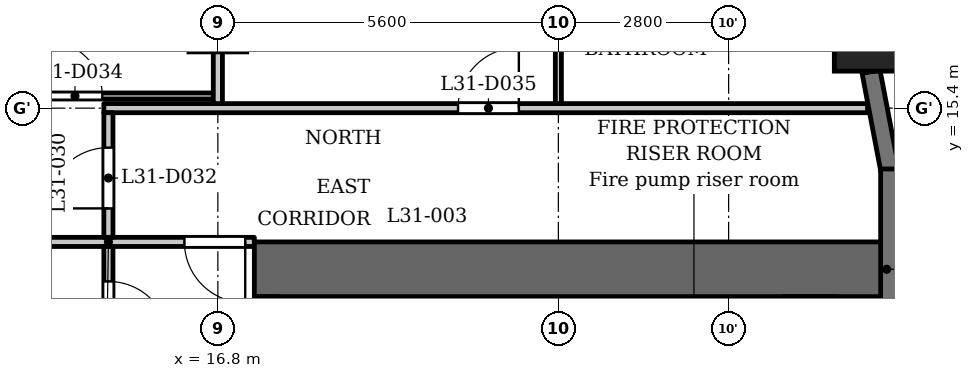
"""IFC4 building model, lengths in metres.
Left out: names, types, materials, properties, quantities, classifications, styles, units other than length and angle.
Written with IfcOpenShell. Run it as: python <this file> out.ifc"""

import sys

from ifc_helpers import new_model, si_unit, direction, frame, frame_2d, origin, origin_2d, place, context, subcontext, project, spatial, rectangle, extrude, element, fill, save


model = new_model("IFC4")
c1 = context("Model", 3, precision=1e-05, world=origin(), true_north=direction((0.0, 1.0)))
c2 = subcontext(c1, "Body", "Model", "MODEL_VIEW")
j1 = project(units=[si_unit("LENGTHUNIT", "METRE"), si_unit("PLANEANGLEUNIT", "RADIAN")], contexts=[c1])
p1 = place(None, origin())
s1 = spatial("IfcSite", under=j1, at=p1, CompositionType="ELEMENT")
p2 = place(p1, origin())
s2 = spatial("IfcBuilding", under=s1, at=p2, CompositionType="ELEMENT")
p3 = place(p2, frame((0.0, 0.0, 121.8)))
s3 = spatial("IfcBuildingStorey", under=s2, at=p3, CompositionType="ELEMENT", Elevation=121.8)
p4 = place(p3, frame((27.538, 16.609, 0.0), z_axis=(0.0, 0.0, 1.0), x_axis=(1.0, 0.0, 0.0)))
e1 = element("IfcColumn", 1, at=p4, inside=s3, PredefinedType="COLUMN", context=c2, shape_type="SweptSolid", body=[
    extrude(rectangle(XDim=1.2, YDim=1.2, at=origin_2d()), origin(), (0.0, 0.0, 1.0), 3.5),
])
p5 = place(p3, frame((16.8, 16.8, 0.0), z_axis=(0.0, 0.0, 1.0), x_axis=(1.0, 0.0, 0.0)))
e2 = element("IfcColumn", 2, at=p5, inside=s3, PredefinedType="COLUMN", context=c2, shape_type="SweptSolid", body=[
    extrude(rectangle(XDim=0.95, YDim=0.95, at=origin_2d()), origin(), (0.0, 0.0, 1.0), 3.5),
])
p6 = place(p3, frame((27.85, 11.8, 0.0), z_axis=(0.0, 0.0, 1.0), x_axis=(0.0, 1.0, 0.0)))
e3 = element("IfcWall", 3, at=p6, inside=s3, PredefinedType="SOLIDWALL", context=c2, shape_type="SweptSolid", body=[
    extrude(rectangle(XDim=2.6, YDim=0.3, at=frame_2d((1.3, 0.0))), origin(), (0.0, 0.0, 1.0), 2.35),
])
p7 = place(p3, frame((27.853, 14.372, 0.0), z_axis=(0.0, 0.0, 1.0), x_axis=(-0.187349172861, 0.982293381546, 0.0)))
e4 = element("IfcWall", 4, at=p7, inside=s3, PredefinedType="SOLIDWALL", context=c2, shape_type="SweptSolid", body=[
    extrude(rectangle(XDim=1.656, YDim=0.3, at=frame_2d((0.828, 0.0))), origin(), (0.0, 0.0, 1.0), 2.35),
])
p8 = place(p3, frame((17.4, 12.75, 0.0), z_axis=(0.0, 0.0, 1.0), x_axis=(1.0, 0.0, 0.0)))
e5 = element("IfcWall", 5, at=p8, inside=s3, PredefinedType="SHEAR", context=c2, shape_type="SweptSolid", body=[
    extrude(rectangle(XDim=10.4, YDim=0.9, at=frame_2d((5.2, 0.0))), origin(), (0.0, 0.0, 1.0), 3.15),
])
p9 = place(p3, frame((17.6, -12.3, 0.0), z_axis=(0.0, 0.0, 1.0), x_axis=(0.0, 1.0, 0.0)))
e6 = element("IfcWall", 6, at=p9, inside=s3, PredefinedType="SHEAR", context=c2, shape_type="SweptSolid", body=[
    extrude(rectangle(XDim=24.6, YDim=0.4, at=frame_2d((12.3, 0.0))), origin(), (0.0, 0.0, 1.0), 3.15),
])
p10 = place(p9, frame((6.0, 0.0, 0.0)))
e7 = element("IfcOpeningElement", 7, at=p10, cuts=e6, PredefinedType="OPENING", context=c2, shape_type="SweptSolid", body=[
    extrude(rectangle(XDim=1.1, YDim=2.1, at=frame_2d((0.55, 1.05))), frame((0.0, 0.21, 0.0), z_axis=(0.0, -1.0, 0.0), x_axis=(1.0, 0.0, 0.0)), (0.0, 0.0, 1.0), 0.42),
])
p11 = place(p9, frame((8.4, 0.0, 0.0)))
e8 = element("IfcOpeningElement", 8, at=p11, cuts=e6, PredefinedType="OPENING", context=c2, shape_type="SweptSolid", body=[
    extrude(rectangle(XDim=1.1, YDim=2.1, at=frame_2d((0.55, 1.05))), frame((0.0, 0.21, 0.0), z_axis=(0.0, -1.0, 0.0), x_axis=(1.0, 0.0, 0.0)), (0.0, 0.0, 1.0), 0.42),
])
p12 = place(p9, frame((10.8, 0.0, 0.0)))
e9 = element("IfcOpeningElement", 9, at=p12, cuts=e6, PredefinedType="OPENING", context=c2, shape_type="SweptSolid", body=[
    extrude(rectangle(XDim=1.1, YDim=2.1, at=frame_2d((0.55, 1.05))), frame((0.0, 0.21, 0.0), z_axis=(0.0, -1.0, 0.0), x_axis=(1.0, 0.0, 0.0)), (0.0, 0.0, 1.0), 0.42),
])
p13 = place(p9, frame((22.8, 0.0, 0.0)))
e10 = element("IfcOpeningElement", 10, at=p13, cuts=e6, PredefinedType="OPENING", context=c2, shape_type="SweptSolid", body=[
    extrude(rectangle(XDim=1.1, YDim=2.1, at=frame_2d((0.55, 1.05))), frame((0.0, 0.21, 0.0), z_axis=(0.0, -1.0, 0.0), x_axis=(1.0, 0.0, 0.0)), (0.0, 0.0, 1.0), 0.42),
])
p14 = place(p9, frame((0.7, 0.0, 0.0)))
e11 = element("IfcOpeningElement", 11, at=p14, cuts=e6, PredefinedType="OPENING", context=c2, shape_type="SweptSolid", body=[
    extrude(rectangle(XDim=1.1, YDim=2.1, at=frame_2d((0.55, 1.05))), frame((0.0, 0.21, 0.0), z_axis=(0.0, -1.0, 0.0), x_axis=(1.0, 0.0, 0.0)), (0.0, 0.0, 1.0), 0.42),
])
p15 = place(p9, frame((12.775, 0.0, 0.0)))
e12 = element("IfcOpeningElement", 12, at=p15, cuts=e6, PredefinedType="OPENING", context=c2, shape_type="SweptSolid", body=[
    extrude(rectangle(XDim=1.8, YDim=2.1, at=frame_2d((0.9, 1.05))), frame((0.0, 0.21, 0.0), z_axis=(0.0, -1.0, 0.0), x_axis=(1.0, 0.0, 0.0)), (0.0, 0.0, 1.0), 0.42),
])
p16 = place(p3, frame((26.55, -12.3, 0.0), z_axis=(0.0, 0.0, 1.0), x_axis=(0.0, 1.0, 0.0)))
e13 = element("IfcWall", 13, at=p16, inside=s3, PredefinedType="SHEAR", context=c2, shape_type="SweptSolid", body=[
    extrude(rectangle(XDim=24.6, YDim=0.9, at=frame_2d((12.3, 0.0))), origin(), (0.0, 0.0, 1.0), 3.15),
])
p17 = place(p3, frame((23.55, 9.8, 0.0), z_axis=(0.0, 0.0, 1.0), x_axis=(0.0, 1.0, 0.0)))
e14 = element("IfcWall", 14, at=p17, inside=s3, PredefinedType="PARTITIONING", context=c2, shape_type="SweptSolid", body=[
    extrude(rectangle(XDim=2.5, YDim=0.2, at=frame_2d((1.25, 0.0))), origin(), (0.0, 0.0, 1.0), 3.15),
])
p18 = place(p17, frame((0.8, 0.0, 0.0)))
e15 = element("IfcOpeningElement", 15, at=p18, cuts=e14, PredefinedType="OPENING", context=c2, shape_type="SweptSolid", body=[
    extrude(rectangle(XDim=0.9, YDim=2.1, at=frame_2d((0.45, 1.05))), frame((0.0, 0.11, 0.0), z_axis=(0.0, -1.0, 0.0), x_axis=(1.0, 0.0, 0.0)), (0.0, 0.0, 1.0), 0.22),
])
p19 = place(p3, frame((-17.4, 13.2, 0.0), z_axis=(0.0, 0.0, 1.0), x_axis=(1.0, 0.0, 0.0)))
e16 = element("IfcWall", 16, at=p19, inside=s3, PredefinedType="PARTITIONING", context=c2, shape_type="SweptSolid", body=[
    extrude(rectangle(XDim=34.8, YDim=0.15, at=frame_2d((17.4, 0.0))), origin(), (0.0, 0.0, 1.0), 3.15),
])
p20 = place(p19, frame((0.25, 0.0, 0.0)))
e17 = element("IfcOpeningElement", 17, at=p20, cuts=e16, PredefinedType="OPENING", context=c2, shape_type="SweptSolid", body=[
    extrude(rectangle(XDim=1.0, YDim=2.1, at=frame_2d((0.5, 1.05))), frame((0.0, 0.085, 0.0), z_axis=(0.0, -1.0, 0.0), x_axis=(1.0, 0.0, 0.0)), (0.0, 0.0, 1.0), 0.17),
])
p21 = place(p19, frame((33.65, 0.0, 0.0)))
e18 = element("IfcOpeningElement", 18, at=p21, cuts=e16, PredefinedType="OPENING", context=c2, shape_type="SweptSolid", body=[
    extrude(rectangle(XDim=1.0, YDim=2.1, at=frame_2d((0.5, 1.05))), frame((0.0, 0.085, 0.0), z_axis=(0.0, -1.0, 0.0), x_axis=(1.0, 0.0, 0.0)), (0.0, 0.0, 1.0), 0.17),
])
p22 = place(p19, frame((15.75, 0.0, 0.0)))
e19 = element("IfcOpeningElement", 19, at=p22, cuts=e16, PredefinedType="OPENING", context=c2, shape_type="SweptSolid", body=[
    extrude(rectangle(XDim=1.0, YDim=2.1, at=frame_2d((0.5, 1.05))), frame((0.0, 0.085, 0.0), z_axis=(0.0, -1.0, 0.0), x_axis=(1.0, 0.0, 0.0)), (0.0, 0.0, 1.0), 0.17),
])
p23 = place(p19, frame((18.1, 0.0, 0.0)))
e20 = element("IfcOpeningElement", 20, at=p23, cuts=e16, PredefinedType="OPENING", context=c2, shape_type="SweptSolid", body=[
    extrude(rectangle(XDim=1.0, YDim=2.1, at=frame_2d((0.5, 1.05))), frame((0.0, 0.085, 0.0), z_axis=(0.0, -1.0, 0.0), x_axis=(1.0, 0.0, 0.0)), (0.0, 0.0, 1.0), 0.17),
])
p24 = place(p19, frame((23.55, 0.0, 0.0)))
e21 = element("IfcOpeningElement", 21, at=p24, cuts=e16, PredefinedType="OPENING", context=c2, shape_type="SweptSolid", body=[
    extrude(rectangle(XDim=1.0, YDim=2.1, at=frame_2d((0.5, 1.05))), frame((0.0, 0.085, 0.0), z_axis=(0.0, -1.0, 0.0), x_axis=(1.0, 0.0, 0.0)), (0.0, 0.0, 1.0), 0.17),
])
p25 = place(p3, frame((14.925, 15.4, 0.0), z_axis=(0.0, 0.0, 1.0), x_axis=(1.0, 0.0, 0.0)))
e22 = element("IfcWall", 22, at=p25, inside=s3, PredefinedType="PARTITIONING", context=c2, shape_type="SweptSolid", body=[
    extrude(rectangle(XDim=12.559, YDim=0.15, at=frame_2d((6.279, 0.0))), origin(), (0.0, 0.0, 1.0), 3.15),
])
p26 = place(p25, frame((5.825, 0.0, 0.0)))
e23 = element("IfcOpeningElement", 23, at=p26, cuts=e22, PredefinedType="OPENING", context=c2, shape_type="SweptSolid", body=[
    extrude(rectangle(XDim=1.0, YDim=2.1, at=frame_2d((0.5, 1.05))), frame((0.0, 0.085, 0.0), z_axis=(0.0, -1.0, 0.0), x_axis=(1.0, 0.0, 0.0)), (0.0, 0.0, 1.0), 0.17),
])
p27 = place(p3, frame((-16.725, 15.6, 0.0), z_axis=(0.0, 0.0, 1.0), x_axis=(1.0, 0.0, 0.0)))
e24 = element("IfcWall", 24, at=p27, inside=s3, PredefinedType="PARTITIONING", context=c2, shape_type="SweptSolid", body=[
    extrude(rectangle(XDim=33.45, YDim=0.1, at=frame_2d((16.725, 0.0))), origin(), (0.0, 0.0, 1.0), 3.15),
])
p28 = place(p27, frame((9.425, 0.0, 0.0)))
e25 = element("IfcOpeningElement", 25, at=p28, cuts=e24, PredefinedType="OPENING", context=c2, shape_type="SweptSolid", body=[
    extrude(rectangle(XDim=0.8, YDim=2.1, at=frame_2d((0.4, 1.05))), frame((0.0, 0.06, 0.0), z_axis=(0.0, -1.0, 0.0), x_axis=(1.0, 0.0, 0.0)), (0.0, 0.0, 1.0), 0.12),
])
p29 = place(p27, frame((6.975, 0.0, 0.0)))
e26 = element("IfcOpeningElement", 26, at=p29, cuts=e24, PredefinedType="OPENING", context=c2, shape_type="SweptSolid", body=[
    extrude(rectangle(XDim=0.9, YDim=2.1, at=frame_2d((0.45, 1.05))), frame((0.0, 0.06, 0.0), z_axis=(0.0, -1.0, 0.0), x_axis=(1.0, 0.0, 0.0)), (0.0, 0.0, 1.0), 0.12),
])
p30 = place(p27, frame((1.875, 0.0, 0.0)))
e27 = element("IfcOpeningElement", 27, at=p30, cuts=e24, PredefinedType="OPENING", context=c2, shape_type="SweptSolid", body=[
    extrude(rectangle(XDim=0.9, YDim=2.1, at=frame_2d((0.45, 1.05))), frame((0.0, 0.06, 0.0), z_axis=(0.0, -1.0, 0.0), x_axis=(1.0, 0.0, 0.0)), (0.0, 0.0, 1.0), 0.12),
])
p31 = place(p27, frame((3.475, 0.0, 0.0)))
e28 = element("IfcOpeningElement", 28, at=p31, cuts=e24, PredefinedType="OPENING", context=c2, shape_type="SweptSolid", body=[
    extrude(rectangle(XDim=0.9, YDim=2.1, at=frame_2d((0.45, 1.05))), frame((0.0, 0.06, 0.0), z_axis=(0.0, -1.0, 0.0), x_axis=(1.0, 0.0, 0.0)), (0.0, 0.0, 1.0), 0.12),
])
p32 = place(p27, frame((11.775, 0.0, 0.0)))
e29 = element("IfcOpeningElement", 29, at=p32, cuts=e24, PredefinedType="OPENING", context=c2, shape_type="SweptSolid", body=[
    extrude(rectangle(XDim=0.8, YDim=2.1, at=frame_2d((0.4, 1.05))), frame((0.0, 0.06, 0.0), z_axis=(0.0, -1.0, 0.0), x_axis=(1.0, 0.0, 0.0)), (0.0, 0.0, 1.0), 0.12),
])
p33 = place(p27, frame((14.175, 0.0, 0.0)))
e30 = element("IfcOpeningElement", 30, at=p33, cuts=e24, PredefinedType="OPENING", context=c2, shape_type="SweptSolid", body=[
    extrude(rectangle(XDim=0.9, YDim=2.1, at=frame_2d((0.45, 1.05))), frame((0.0, 0.06, 0.0), z_axis=(0.0, -1.0, 0.0), x_axis=(1.0, 0.0, 0.0)), (0.0, 0.0, 1.0), 0.12),
])
p34 = place(p27, frame((20.725, 0.0, 0.0)))
e31 = element("IfcOpeningElement", 31, at=p34, cuts=e24, PredefinedType="OPENING", context=c2, shape_type="SweptSolid", body=[
    extrude(rectangle(XDim=0.8, YDim=2.1, at=frame_2d((0.4, 1.05))), frame((0.0, 0.06, 0.0), z_axis=(0.0, -1.0, 0.0), x_axis=(1.0, 0.0, 0.0)), (0.0, 0.0, 1.0), 0.12),
])
p35 = place(p27, frame((18.375, 0.0, 0.0)))
e32 = element("IfcOpeningElement", 32, at=p35, cuts=e24, PredefinedType="OPENING", context=c2, shape_type="SweptSolid", body=[
    extrude(rectangle(XDim=0.9, YDim=2.1, at=frame_2d((0.45, 1.05))), frame((0.0, 0.06, 0.0), z_axis=(0.0, -1.0, 0.0), x_axis=(1.0, 0.0, 0.0)), (0.0, 0.0, 1.0), 0.12),
])
p36 = place(p27, frame((26.425, 0.0, 0.0)))
e33 = element("IfcOpeningElement", 33, at=p36, cuts=e24, PredefinedType="OPENING", context=c2, shape_type="SweptSolid", body=[
    extrude(rectangle(XDim=0.8, YDim=2.1, at=frame_2d((0.4, 1.05))), frame((0.0, 0.06, 0.0), z_axis=(0.0, -1.0, 0.0), x_axis=(1.0, 0.0, 0.0)), (0.0, 0.0, 1.0), 0.12),
])
p37 = place(p27, frame((23.875, 0.0, 0.0)))
e34 = element("IfcOpeningElement", 34, at=p37, cuts=e24, PredefinedType="OPENING", context=c2, shape_type="SweptSolid", body=[
    extrude(rectangle(XDim=0.9, YDim=2.1, at=frame_2d((0.45, 1.05))), frame((0.0, 0.06, 0.0), z_axis=(0.0, -1.0, 0.0), x_axis=(1.0, 0.0, 0.0)), (0.0, 0.0, 1.0), 0.12),
])
p38 = place(p27, frame((28.575, 0.0, 0.0)))
e35 = element("IfcOpeningElement", 35, at=p38, cuts=e24, PredefinedType="OPENING", context=c2, shape_type="SweptSolid", body=[
    extrude(rectangle(XDim=0.8, YDim=2.1, at=frame_2d((0.4, 1.05))), frame((0.0, 0.06, 0.0), z_axis=(0.0, -1.0, 0.0), x_axis=(1.0, 0.0, 0.0)), (0.0, 0.0, 1.0), 0.12),
])
p39 = place(p27, frame((30.725, 0.0, 0.0)))
e36 = element("IfcOpeningElement", 36, at=p39, cuts=e24, PredefinedType="OPENING", context=c2, shape_type="SweptSolid", body=[
    extrude(rectangle(XDim=0.9, YDim=2.1, at=frame_2d((0.45, 1.05))), frame((0.0, 0.06, 0.0), z_axis=(0.0, -1.0, 0.0), x_axis=(1.0, 0.0, 0.0)), (0.0, 0.0, 1.0), 0.12),
])
p40 = place(p3, frame((15.0, 6.769, 0.0), z_axis=(0.0, 0.0, 1.0), x_axis=(0.0, 1.0, 0.0)))
e37 = element("IfcWall", 37, at=p40, inside=s3, PredefinedType="PARTITIONING", context=c2, shape_type="SweptSolid", body=[
    extrude(rectangle(XDim=6.356, YDim=0.15, at=frame_2d((3.178, 0.0))), origin(), (0.0, 0.0, 1.0), 3.15),
])
p41 = place(p40, frame((4.781, 0.0, 0.0)))
e38 = element("IfcOpeningElement", 38, at=p41, cuts=e37, PredefinedType="OPENING", context=c2, shape_type="SweptSolid", body=[
    extrude(rectangle(XDim=1.0, YDim=2.1, at=frame_2d((0.5, 1.05))), frame((0.0, 0.085, 0.0), z_axis=(0.0, -1.0, 0.0), x_axis=(1.0, 0.0, 0.0)), (0.0, 0.0, 1.0), 0.17),
])
p42 = place(p3, frame((15.0, 13.275, 0.0), z_axis=(0.0, 0.0, 1.0), x_axis=(0.0, 1.0, 0.0)))
e39 = element("IfcWall", 39, at=p42, inside=s3, PredefinedType="PARTITIONING", context=c2, shape_type="SweptSolid", body=[
    extrude(rectangle(XDim=2.05, YDim=0.15, at=frame_2d((1.025, 0.0))), origin(), (0.0, 0.0, 1.0), 3.15),
])
p43 = place(p42, frame((0.476, 0.0, 0.0)))
e40 = element("IfcOpeningElement", 40, at=p43, cuts=e39, PredefinedType="OPENING", context=c2, shape_type="SweptSolid", body=[
    extrude(rectangle(XDim=1.0, YDim=2.1, at=frame_2d((0.5, 1.05))), frame((0.0, 0.085, 0.0), z_axis=(0.0, -1.0, 0.0), x_axis=(1.0, 0.0, 0.0)), (0.0, 0.0, 1.0), 0.17),
])
p44 = place(p3, frame((16.8, 15.475, 0.0), z_axis=(0.0, 0.0, 1.0), x_axis=(0.0, 1.0, 0.0)))
e41 = element("IfcWall", 41, at=p44, inside=s3, PredefinedType="PARTITIONING", context=c2, shape_type="SweptSolid", body=[
    extrude(rectangle(XDim=7.505, YDim=0.15, at=frame_2d((3.752, 0.0))), origin(), (0.0, 0.0, 1.0), 3.15),
])
p45 = place(p3, frame((22.4, 15.475, 0.0), z_axis=(0.0, 0.0, 1.0), x_axis=(0.0, 1.0, 0.0)))
e42 = element("IfcWall", 42, at=p45, inside=s3, PredefinedType="PARTITIONING", context=c2, shape_type="SweptSolid", body=[
    extrude(rectangle(XDim=2.575, YDim=0.1, at=frame_2d((1.288, 0.0))), origin(), (0.0, 0.0, 1.0), 3.15),
])
p46 = place(p41, origin())
e43 = element("IfcDoor", 43, at=p46, inside=s3, OperationType="SINGLE_SWING_LEFT", PredefinedType="DOOR", context=c2, shape_type="SweptSolid", body=[
    extrude(rectangle(XDim=1.0, YDim=2.1, at=frame_2d((0.5, 1.05))), frame((0.0, 0.025, 0.0), z_axis=(0.0, -1.0, 0.0), x_axis=(1.0, 0.0, 0.0)), (0.0, 0.0, 1.0), 0.05),
])
fill(e38, e43)
p47 = place(p21, origin())
e44 = element("IfcDoor", 44, at=p47, inside=s3, OperationType="SINGLE_SWING_RIGHT", PredefinedType="DOOR", context=c2, shape_type="SweptSolid", body=[
    extrude(rectangle(XDim=1.0, YDim=2.1, at=frame_2d((0.5, 1.05))), frame((0.0, 0.025, 0.0), z_axis=(0.0, -1.0, 0.0), x_axis=(1.0, 0.0, 0.0)), (0.0, 0.0, 1.0), 0.05),
])
fill(e18, e44)
p48 = place(p43, origin())
e45 = element("IfcDoor", 45, at=p48, inside=s3, OperationType="SINGLE_SWING_RIGHT", PredefinedType="DOOR", context=c2, shape_type="SweptSolid", body=[
    extrude(rectangle(XDim=1.0, YDim=2.1, at=frame_2d((0.5, 1.05))), frame((0.0, 0.025, 0.0), z_axis=(0.0, -1.0, 0.0), x_axis=(1.0, 0.0, 0.0)), (0.0, 0.0, 1.0), 0.05),
])
fill(e40, e45)
p49 = place(p39, origin())
e46 = element("IfcDoor", 46, at=p49, inside=s3, OperationType="SINGLE_SWING_RIGHT", PredefinedType="DOOR", context=c2, shape_type="SweptSolid", body=[
    extrude(rectangle(XDim=0.9, YDim=2.1, at=frame_2d((0.45, 1.05))), frame((0.0, 0.025, 0.0), z_axis=(0.0, -1.0, 0.0), x_axis=(1.0, 0.0, 0.0)), (0.0, 0.0, 1.0), 0.05),
])
fill(e36, e46)
p50 = place(p26, origin())
e47 = element("IfcDoor", 47, at=p50, inside=s3, OperationType="SINGLE_SWING_LEFT", PredefinedType="DOOR", context=c2, shape_type="SweptSolid", body=[
    extrude(rectangle(XDim=1.0, YDim=2.1, at=frame_2d((0.5, 1.05))), frame((0.0, 0.025, 0.0), z_axis=(0.0, -1.0, 0.0), x_axis=(1.0, 0.0, 0.0)), (0.0, 0.0, 1.0), 0.05),
])
fill(e23, e47)
save(model, sys.argv[1])
